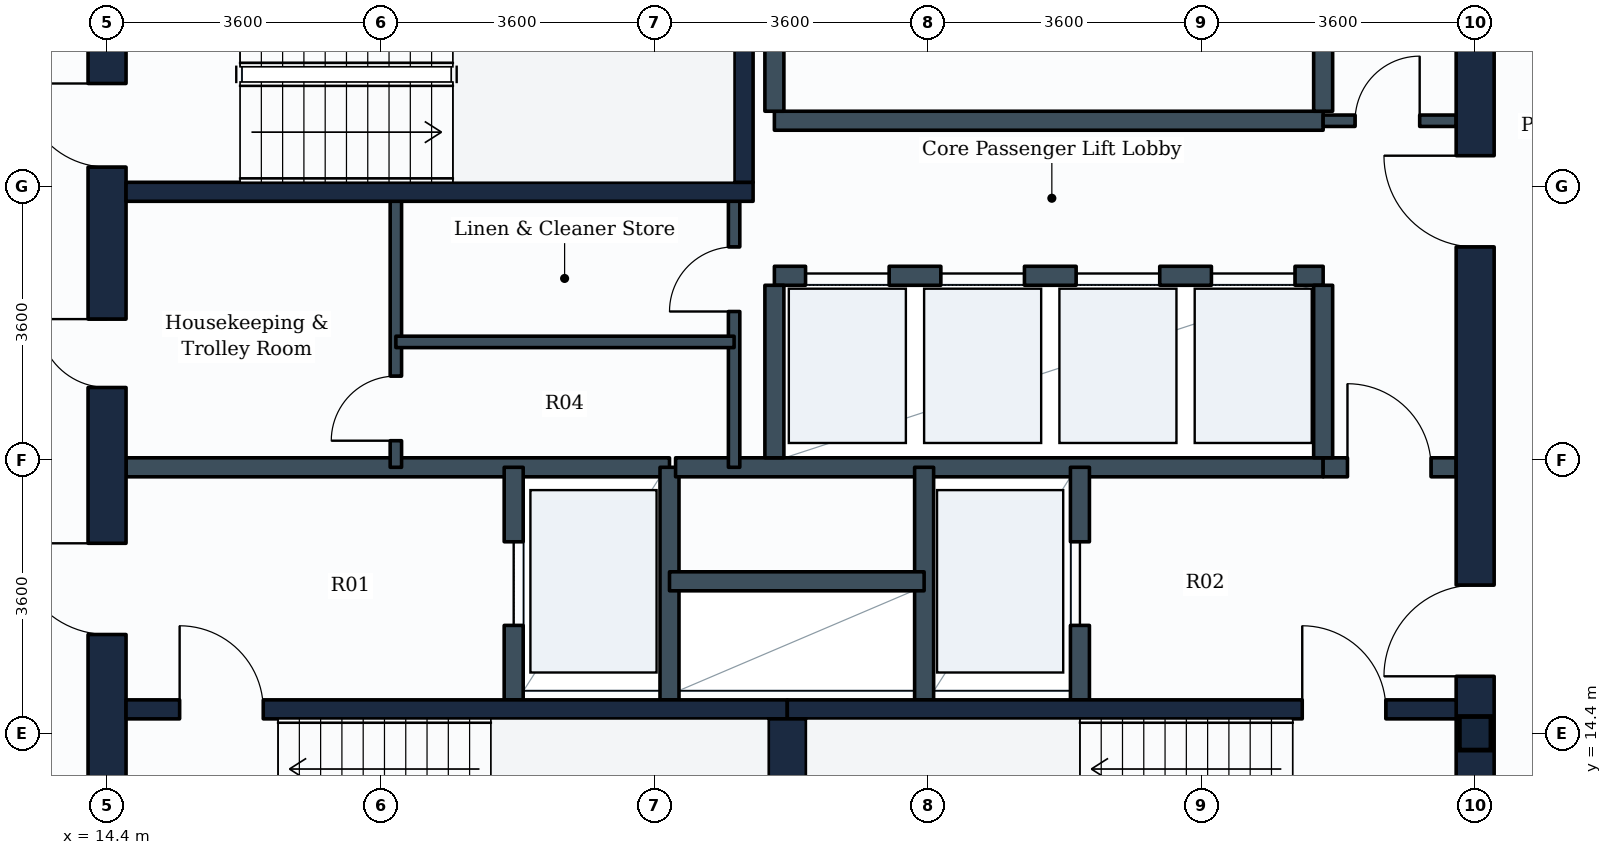
"""IFC4 building model, lengths in metres.
Left out: names, types, materials, properties, quantities, classifications, styles, units other than length and angle.
Written with IfcOpenShell. Run it as: python <this file> out.ifc"""

import sys

from ifc_helpers import new_model, si_unit, direction, frame, frame_2d, origin, origin_2d, place, context, subcontext, project, spatial, rectangle, i_section, extrude, element, fill, save


model = new_model("IFC4")
c1 = context("Model", 3, precision=1e-05, world=origin(), true_north=direction((0.0, 1.0)))
c2 = subcontext(c1, "Body", "Model", "MODEL_VIEW")
j1 = project(units=[si_unit("LENGTHUNIT", "METRE"), si_unit("PLANEANGLEUNIT", "RADIAN")], contexts=[c1])
p1 = place(None, origin())
s1 = spatial("IfcSite", under=j1, at=p1, CompositionType="ELEMENT")
p2 = place(p1, origin())
s2 = spatial("IfcBuilding", under=s1, at=p2, CompositionType="ELEMENT")
p3 = place(p2, frame((0.0, 0.0, 190.0)))
s3 = spatial("IfcBuildingStorey", under=s2, at=p3, CompositionType="ELEMENT", Elevation=190.0)
p4 = place(p3, frame((32.4, 14.4, 0.0), z_axis=(0.0, 0.0, 1.0), x_axis=(1.0, 0.0, 0.0)))
e1 = element("IfcColumn", 1, at=p4, inside=s3, PredefinedType="COLUMN", context=c2, shape_type="SweptSolid", body=[
    extrude(i_section(OverallWidth=0.416, OverallDepth=0.442, WebThickness=0.025, FlangeThickness=0.041, FilletRadius=0.015, at=origin_2d()), origin(), (0.0, 0.0, 1.0), 3.8),
])
p5 = place(p3, frame((14.4, 10.8, 0.0), z_axis=(0.0, 0.0, 1.0), x_axis=(0.0, 1.0, 0.0)))
e2 = element("IfcWall", 2, at=p5, inside=s3, PredefinedType="SHEAR", context=c2, shape_type="SweptSolid", body=[
    extrude(rectangle(XDim=14.4, YDim=0.5, at=frame_2d((7.2, 0.0))), origin(), (0.0, 0.0, 1.0), 3.55),
])
p6 = place(p5, frame((11.05, 0.0, 0.0)))
e3 = element("IfcOpeningElement", 3, at=p6, cuts=e2, PredefinedType="OPENING", context=c2, shape_type="SweptSolid", body=[
    extrude(rectangle(XDim=1.1, YDim=2.1, at=frame_2d((0.55, 1.05))), frame((0.0, 0.26, 0.0), z_axis=(0.0, -1.0, 0.0), x_axis=(1.0, 0.0, 0.0)), (0.0, 0.0, 1.0), 0.52),
])
p7 = place(p5, frame((4.9, 0.0, 0.0)))
e4 = element("IfcOpeningElement", 4, at=p7, cuts=e2, PredefinedType="OPENING", context=c2, shape_type="SweptSolid", body=[
    extrude(rectangle(XDim=1.2, YDim=2.1, at=frame_2d((0.6, 1.05))), frame((0.0, 0.26, 0.0), z_axis=(0.0, -1.0, 0.0), x_axis=(1.0, 0.0, 0.0)), (0.0, 0.0, 1.0), 0.52),
])
p8 = place(p5, frame((8.15, 0.0, 0.0)))
e5 = element("IfcOpeningElement", 5, at=p8, cuts=e2, PredefinedType="OPENING", context=c2, shape_type="SweptSolid", body=[
    extrude(rectangle(XDim=0.9, YDim=2.1, at=frame_2d((0.45, 1.05))), frame((0.0, 0.26, 0.0), z_axis=(0.0, -1.0, 0.0), x_axis=(1.0, 0.0, 0.0)), (0.0, 0.0, 1.0), 0.52),
])
p9 = place(p3, frame((32.4, 10.8, 0.0), z_axis=(0.0, 0.0, 1.0), x_axis=(0.0, 1.0, 0.0)))
e6 = element("IfcWall", 6, at=p9, inside=s3, PredefinedType="SHEAR", context=c2, shape_type="SweptSolid", body=[
    extrude(rectangle(XDim=14.4, YDim=0.5, at=frame_2d((7.2, 0.0))), origin(), (0.0, 0.0, 1.0), 3.55),
])
p10 = place(p9, frame((4.35, 0.0, 0.0)))
e7 = element("IfcOpeningElement", 7, at=p10, cuts=e6, PredefinedType="OPENING", context=c2, shape_type="SweptSolid", body=[
    extrude(rectangle(XDim=1.2, YDim=2.1, at=frame_2d((0.6, 1.05))), frame((0.0, 0.26, 0.0), z_axis=(0.0, -1.0, 0.0), x_axis=(1.0, 0.0, 0.0)), (0.0, 0.0, 1.0), 0.52),
])
p11 = place(p9, frame((10.0, 0.0, 0.0)))
e8 = element("IfcOpeningElement", 8, at=p11, cuts=e6, PredefinedType="OPENING", context=c2, shape_type="SweptSolid", body=[
    extrude(rectangle(XDim=1.2, YDim=2.1, at=frame_2d((0.6, 1.05))), frame((0.0, 0.26, 0.0), z_axis=(0.0, -1.0, 0.0), x_axis=(1.0, 0.0, 0.0)), (0.0, 0.0, 1.0), 0.52),
])
p12 = place(p3, frame((14.65, 14.715, 0.0), z_axis=(0.0, 0.0, 1.0), x_axis=(1.0, 0.0, 0.0)))
e9 = element("IfcWall", 9, at=p12, inside=s3, PredefinedType="SHEAR", context=c2, shape_type="SweptSolid", body=[
    extrude(rectangle(XDim=8.7, YDim=0.25, at=frame_2d((4.35, 0.0))), origin(), (0.0, 0.0, 1.0), 3.55),
])
p13 = place(p12, frame((0.705, 0.0, 0.0)))
e10 = element("IfcOpeningElement", 10, at=p13, cuts=e9, PredefinedType="OPENING", context=c2, shape_type="SweptSolid", body=[
    extrude(rectangle(XDim=1.1, YDim=2.1, at=frame_2d((0.55, 1.05))), frame((0.0, 0.135, 0.0), z_axis=(0.0, -1.0, 0.0), x_axis=(1.0, 0.0, 0.0)), (0.0, 0.0, 1.0), 0.27),
])
p14 = place(p3, frame((23.35, 14.715, 0.0), z_axis=(0.0, 0.0, 1.0), x_axis=(1.0, 0.0, 0.0)))
e11 = element("IfcWall", 11, at=p14, inside=s3, PredefinedType="SHEAR", context=c2, shape_type="SweptSolid", body=[
    extrude(rectangle(XDim=8.8, YDim=0.25, at=frame_2d((4.4, 0.0))), origin(), (0.0, 0.0, 1.0), 3.55),
])
p15 = place(p14, frame((6.775, 0.0, 0.0)))
e12 = element("IfcOpeningElement", 12, at=p15, cuts=e11, PredefinedType="OPENING", context=c2, shape_type="SweptSolid", body=[
    extrude(rectangle(XDim=1.1, YDim=2.1, at=frame_2d((0.55, 1.05))), frame((0.0, 0.135, 0.0), z_axis=(0.0, -1.0, 0.0), x_axis=(1.0, 0.0, 0.0)), (0.0, 0.0, 1.0), 0.27),
])
p16 = place(p3, frame((23.35, 11.75, 0.0), z_axis=(0.0, 0.0, 1.0), x_axis=(0.0, 1.0, 0.0)))
e13 = element("IfcWall", 13, at=p16, inside=s3, PredefinedType="SHEAR", context=c2, shape_type="SweptSolid", body=[
    extrude(rectangle(XDim=2.84, YDim=0.5, at=frame_2d((1.42, 0.0))), origin(), (0.0, 0.0, 1.0), 3.55),
])
p17 = place(p3, frame((14.65, 21.525, 0.0), z_axis=(0.0, 0.0, 1.0), x_axis=(1.0, 0.0, 0.0)))
e14 = element("IfcWall", 14, at=p17, inside=s3, PredefinedType="SHEAR", context=c2, shape_type="SweptSolid", body=[
    extrude(rectangle(XDim=8.25, YDim=0.25, at=frame_2d((4.125, 0.0))), origin(), (0.0, 0.0, 1.0), 3.55),
])
p18 = place(p3, frame((22.775, 21.65, 0.0), z_axis=(0.0, 0.0, 1.0), x_axis=(0.0, 1.0, 0.0)))
e15 = element("IfcWall", 15, at=p18, inside=s3, PredefinedType="SHEAR", context=c2, shape_type="SweptSolid", body=[
    extrude(rectangle(XDim=2.84, YDim=0.25, at=frame_2d((1.42, 0.0))), origin(), (0.0, 0.0, 1.0), 3.55),
])
p19 = place(p3, frame((14.65, 17.9, 0.0), z_axis=(0.0, 0.0, 1.0), x_axis=(1.0, 0.0, 0.0)))
e16 = element("IfcWall", 16, at=p19, inside=s3, PredefinedType="PARTITIONING", context=c2, shape_type="SweptSolid", body=[
    extrude(rectangle(XDim=7.15, YDim=0.25, at=frame_2d((3.575, 0.0))), origin(), (0.0, 0.0, 1.0), 3.535),
])
p20 = place(p3, frame((19.75, 14.84, 0.0), z_axis=(0.0, 0.0, 1.0), x_axis=(0.0, 1.0, 0.0)))
e17 = element("IfcWall", 17, at=p20, inside=s3, PredefinedType="PARTITIONING", context=c2, shape_type="SweptSolid", body=[
    extrude(rectangle(XDim=3.06, YDim=0.25, at=frame_2d((1.53, 0.0))), origin(), (0.0, 0.0, 1.0), 3.535),
])
p21 = place(p20, frame((0.98, 0.0, 0.0)))
e18 = element("IfcOpeningElement", 18, at=p21, cuts=e17, PredefinedType="OPENING", context=c2, shape_type="SweptSolid", body=[
    extrude(rectangle(XDim=1.1, YDim=2.1, at=frame_2d((0.55, 1.05))), frame((0.0, 0.135, 0.0), z_axis=(0.0, -1.0, 0.0), x_axis=(1.0, 0.0, 0.0)), (0.0, 0.0, 1.0), 0.27),
])
p22 = place(p3, frame((21.8, 14.84, 0.0), z_axis=(0.0, 0.0, 1.0), x_axis=(0.0, 1.0, 0.0)))
e19 = element("IfcWall", 19, at=p22, inside=s3, PredefinedType="PARTITIONING", context=c2, shape_type="SweptSolid", body=[
    extrude(rectangle(XDim=3.06, YDim=0.25, at=frame_2d((1.53, 0.0))), origin(), (0.0, 0.0, 1.0), 3.535),
])
p23 = place(p3, frame((21.88, 17.9, 0.0), z_axis=(0.0, 0.0, 1.0), x_axis=(1.0, 0.0, 0.0)))
e20 = element("IfcWall", 20, at=p23, inside=s3, PredefinedType="PARTITIONING", context=c2, shape_type="SweptSolid", body=[
    extrude(rectangle(XDim=8.52, YDim=0.25, at=frame_2d((4.26, 0.0))), origin(), (0.0, 0.0, 1.0), 3.535),
])
p24 = place(p3, frame((30.4, 17.9, 0.0), z_axis=(0.0, 0.0, 1.0), x_axis=(1.0, 0.0, 0.0)))
e21 = element("IfcWall", 21, at=p24, inside=s3, PredefinedType="PARTITIONING", context=c2, shape_type="SweptSolid", body=[
    extrude(rectangle(XDim=1.75, YDim=0.25, at=frame_2d((0.875, 0.0))), origin(), (0.0, 0.0, 1.0), 3.535),
])
p25 = place(p24, frame((0.32, 0.0, 0.0)))
e22 = element("IfcOpeningElement", 22, at=p25, cuts=e21, PredefinedType="OPENING", context=c2, shape_type="SweptSolid", body=[
    extrude(rectangle(XDim=1.1, YDim=2.1, at=frame_2d((0.55, 1.05))), frame((0.0, 0.135, 0.0), z_axis=(0.0, -1.0, 0.0), x_axis=(1.0, 0.0, 0.0)), (0.0, 0.0, 1.0), 0.27),
])
p26 = place(p3, frame((25.15, 14.84, 0.0), z_axis=(0.0, 0.0, 1.0), x_axis=(0.0, 1.0, 0.0)))
e23 = element("IfcWall", 23, at=p26, inside=s3, PredefinedType="PARTITIONING", context=c2, shape_type="SweptSolid", body=[
    extrude(rectangle(XDim=3.06, YDim=0.25, at=frame_2d((1.53, 0.0))), origin(), (0.0, 0.0, 1.0), 3.535),
])
p27 = place(p3, frame((27.2, 14.84, 0.0), z_axis=(0.0, 0.0, 1.0), x_axis=(0.0, 1.0, 0.0)))
e24 = element("IfcWall", 24, at=p27, inside=s3, PredefinedType="PARTITIONING", context=c2, shape_type="SweptSolid", body=[
    extrude(rectangle(XDim=3.06, YDim=0.25, at=frame_2d((1.53, 0.0))), origin(), (0.0, 0.0, 1.0), 3.535),
])
p28 = place(p27, frame((0.98, 0.0, 0.0)))
e25 = element("IfcOpeningElement", 25, at=p28, cuts=e24, PredefinedType="OPENING", context=c2, shape_type="SweptSolid", body=[
    extrude(rectangle(XDim=1.1, YDim=2.1, at=frame_2d((0.55, 1.05))), frame((0.0, 0.135, 0.0), z_axis=(0.0, -1.0, 0.0), x_axis=(1.0, 0.0, 0.0)), (0.0, 0.0, 1.0), 0.27),
])
p29 = place(p3, frame((21.8, 16.4, 0.0), z_axis=(0.0, 0.0, 1.0), x_axis=(1.0, 0.0, 0.0)))
e26 = element("IfcWall", 26, at=p29, inside=s3, PredefinedType="PARTITIONING", context=c2, shape_type="SweptSolid", body=[
    extrude(rectangle(XDim=3.35, YDim=0.25, at=frame_2d((1.675, 0.0))), origin(), (0.0, 0.0, 1.0), 3.535),
])
p30 = place(p3, frame((23.18, 20.42, 0.0), z_axis=(0.0, 0.0, 1.0), x_axis=(1.0, 0.0, 0.0)))
e27 = element("IfcWall", 27, at=p30, inside=s3, PredefinedType="PARTITIONING", context=c2, shape_type="SweptSolid", body=[
    extrude(rectangle(XDim=7.22, YDim=0.25, at=frame_2d((3.61, 0.0))), origin(), (0.0, 0.0, 1.0), 3.535),
])
p31 = place(p30, frame((0.41, 0.0, 0.0)))
e28 = element("IfcOpeningElement", 28, at=p31, cuts=e27, PredefinedType="OPENING", context=c2, shape_type="SweptSolid", body=[
    extrude(rectangle(XDim=1.1, YDim=2.1, at=frame_2d((0.55, 1.05))), frame((0.0, 0.135, 0.0), z_axis=(0.0, -1.0, 0.0), x_axis=(1.0, 0.0, 0.0)), (0.0, 0.0, 1.0), 0.27),
])
p32 = place(p30, frame((2.19, 0.0, 0.0)))
e29 = element("IfcOpeningElement", 29, at=p32, cuts=e27, PredefinedType="OPENING", context=c2, shape_type="SweptSolid", body=[
    extrude(rectangle(XDim=1.1, YDim=2.1, at=frame_2d((0.55, 1.05))), frame((0.0, 0.135, 0.0), z_axis=(0.0, -1.0, 0.0), x_axis=(1.0, 0.0, 0.0)), (0.0, 0.0, 1.0), 0.27),
])
p33 = place(p30, frame((3.97, 0.0, 0.0)))
e30 = element("IfcOpeningElement", 30, at=p33, cuts=e27, PredefinedType="OPENING", context=c2, shape_type="SweptSolid", body=[
    extrude(rectangle(XDim=1.1, YDim=2.1, at=frame_2d((0.55, 1.05))), frame((0.0, 0.135, 0.0), z_axis=(0.0, -1.0, 0.0), x_axis=(1.0, 0.0, 0.0)), (0.0, 0.0, 1.0), 0.27),
])
p34 = place(p30, frame((5.75, 0.0, 0.0)))
e31 = element("IfcOpeningElement", 31, at=p34, cuts=e27, PredefinedType="OPENING", context=c2, shape_type="SweptSolid", body=[
    extrude(rectangle(XDim=1.1, YDim=2.1, at=frame_2d((0.55, 1.05))), frame((0.0, 0.135, 0.0), z_axis=(0.0, -1.0, 0.0), x_axis=(1.0, 0.0, 0.0)), (0.0, 0.0, 1.0), 0.27),
])
for number, where, z_axis, x_axis in (
    (32, (23.18, 18.025, 0.0), (0.0, 0.0, 1.0), (0.0, 1.0, 0.0)),
    (33, (30.4, 18.025, 0.0), (0.0, 0.0, 1.0), (0.0, 1.0, 0.0)),
):
    element("IfcWall", number, at=place(p3, frame(where, z_axis=z_axis, x_axis=x_axis)), inside=s3, PredefinedType="PARTITIONING", context=c2, shape_type="SweptSolid", body=[
        extrude(rectangle(XDim=2.27, YDim=0.25, at=frame_2d((1.135, 0.0))), origin(), (0.0, 0.0, 1.0), 3.535),
    ])
p35 = place(p3, frame((23.18, 22.46, 0.0), z_axis=(0.0, 0.0, 1.0), x_axis=(1.0, 0.0, 0.0)))
e34 = element("IfcWall", 34, at=p35, inside=s3, PredefinedType="PARTITIONING", context=c2, shape_type="SweptSolid", body=[
    extrude(rectangle(XDim=7.22, YDim=0.25, at=frame_2d((3.61, 0.0))), origin(), (0.0, 0.0, 1.0), 3.535),
])
for number, where, z_axis, x_axis in (
    (35, (23.18, 22.585, 0.0), (0.0, 0.0, 1.0), (0.0, 1.0, 0.0)),
    (36, (30.4, 22.585, 0.0), (0.0, 0.0, 1.0), (0.0, 1.0, 0.0)),
):
    element("IfcWall", number, at=place(p3, frame(where, z_axis=z_axis, x_axis=x_axis)), inside=s3, PredefinedType="PARTITIONING", context=c2, shape_type="SweptSolid", body=[
        extrude(rectangle(XDim=2.315, YDim=0.25, at=frame_2d((1.157, 0.0))), origin(), (0.0, 0.0, 1.0), 3.535),
    ])
p36 = place(p3, frame((22.65, 17.9, 0.0), z_axis=(0.0, 0.0, 1.0), x_axis=(0.0, 1.0, 0.0)))
e37 = element("IfcWall", 37, at=p36, inside=s3, PredefinedType="PARTITIONING", context=c2, shape_type="SweptSolid", body=[
    extrude(rectangle(XDim=3.625, YDim=0.15, at=frame_2d((1.812, 0.0))), origin(), (0.0, 0.0, 1.0), 3.535),
])
p37 = place(p36, frame((2.05, 0.0, 0.0)))
e38 = element("IfcOpeningElement", 38, at=p37, cuts=e37, PredefinedType="OPENING", context=c2, shape_type="SweptSolid", body=[
    extrude(rectangle(XDim=0.85, YDim=2.1, at=frame_2d((0.425, 1.05))), frame((0.0, 0.085, 0.0), z_axis=(0.0, -1.0, 0.0), x_axis=(1.0, 0.0, 0.0)), (0.0, 0.0, 1.0), 0.17),
])
p38 = place(p3, frame((18.2, 17.9, 0.0), z_axis=(0.0, 0.0, 1.0), x_axis=(0.0, 1.0, 0.0)))
e39 = element("IfcWall", 39, at=p38, inside=s3, PredefinedType="PARTITIONING", context=c2, shape_type="SweptSolid", body=[
    extrude(rectangle(XDim=3.625, YDim=0.15, at=frame_2d((1.812, 0.0))), origin(), (0.0, 0.0, 1.0), 3.535),
])
p39 = place(p38, frame((0.35, 0.0, 0.0)))
e40 = element("IfcOpeningElement", 40, at=p39, cuts=e39, PredefinedType="OPENING", context=c2, shape_type="SweptSolid", body=[
    extrude(rectangle(XDim=0.85, YDim=2.1, at=frame_2d((0.425, 1.05))), frame((0.0, 0.085, 0.0), z_axis=(0.0, -1.0, 0.0), x_axis=(1.0, 0.0, 0.0)), (0.0, 0.0, 1.0), 0.17),
])
p40 = place(p3, frame((18.2, 19.55, 0.0), z_axis=(0.0, 0.0, 1.0), x_axis=(1.0, 0.0, 0.0)))
e41 = element("IfcWall", 41, at=p40, inside=s3, PredefinedType="PARTITIONING", context=c2, shape_type="SweptSolid", body=[
    extrude(rectangle(XDim=4.45, YDim=0.15, at=frame_2d((2.225, 0.0))), origin(), (0.0, 0.0, 1.0), 3.535),
])
p41 = place(p3, frame((30.4, 22.46, 0.0), z_axis=(0.0, 0.0, 1.0), x_axis=(1.0, 0.0, 0.0)))
e42 = element("IfcWall", 42, at=p41, inside=s3, PredefinedType="PARTITIONING", context=c2, shape_type="SweptSolid", body=[
    extrude(rectangle(XDim=1.75, YDim=0.15, at=frame_2d((0.875, 0.0))), origin(), (0.0, 0.0, 1.0), 3.535),
])
p42 = place(p41, frame((0.42, 0.0, 0.0)))
e43 = element("IfcOpeningElement", 43, at=p42, cuts=e42, PredefinedType="OPENING", context=c2, shape_type="SweptSolid", body=[
    extrude(rectangle(XDim=0.85, YDim=2.1, at=frame_2d((0.425, 1.05))), frame((0.0, 0.085, 0.0), z_axis=(0.0, -1.0, 0.0), x_axis=(1.0, 0.0, 0.0)), (0.0, 0.0, 1.0), 0.17),
])
p43 = place(p13, origin())
e44 = element("IfcDoor", 44, at=p43, inside=s3, OperationType="SINGLE_SWING_LEFT", PredefinedType="DOOR", context=c2, shape_type="SweptSolid", body=[
    extrude(rectangle(XDim=1.1, YDim=2.1, at=frame_2d((0.55, 1.05))), frame((0.0, 0.025, 0.0), z_axis=(0.0, -1.0, 0.0), x_axis=(1.0, 0.0, 0.0)), (0.0, 0.0, 1.0), 0.05),
])
fill(e10, e44)
p44 = place(p15, origin())
e45 = element("IfcDoor", 45, at=p44, inside=s3, OperationType="SINGLE_SWING_LEFT", PredefinedType="DOOR", context=c2, shape_type="SweptSolid", body=[
    extrude(rectangle(XDim=1.1, YDim=2.1, at=frame_2d((0.55, 1.05))), frame((0.0, 0.025, 0.0), z_axis=(0.0, -1.0, 0.0), x_axis=(1.0, 0.0, 0.0)), (0.0, 0.0, 1.0), 0.05),
])
fill(e12, e45)
p45 = place(p6, origin())
e46 = element("IfcDoor", 46, at=p45, inside=s3, OperationType="SINGLE_SWING_RIGHT", PredefinedType="DOOR", context=c2, shape_type="SweptSolid", body=[
    extrude(rectangle(XDim=1.1, YDim=2.1, at=frame_2d((0.55, 1.05))), frame((0.0, 0.025, 0.0), z_axis=(0.0, -1.0, 0.0), x_axis=(1.0, 0.0, 0.0)), (0.0, 0.0, 1.0), 0.05),
])
fill(e3, e46)
p46 = place(p21, origin())
e47 = element("IfcDoor", 47, at=p46, inside=s3, OperationType="SLIDING_TO_LEFT", PredefinedType="DOOR", context=c2, shape_type="SweptSolid", body=[
    extrude(rectangle(XDim=1.1, YDim=2.1, at=frame_2d((0.55, 1.05))), frame((0.0, 0.025, 0.0), z_axis=(0.0, -1.0, 0.0), x_axis=(1.0, 0.0, 0.0)), (0.0, 0.0, 1.0), 0.05),
])
fill(e18, e47)
p47 = place(p28, origin())
e48 = element("IfcDoor", 48, at=p47, inside=s3, OperationType="SLIDING_TO_LEFT", PredefinedType="DOOR", context=c2, shape_type="SweptSolid", body=[
    extrude(rectangle(XDim=1.1, YDim=2.1, at=frame_2d((0.55, 1.05))), frame((0.0, 0.025, 0.0), z_axis=(0.0, -1.0, 0.0), x_axis=(1.0, 0.0, 0.0)), (0.0, 0.0, 1.0), 0.05),
])
fill(e25, e48)
p48 = place(p7, origin())
e49 = element("IfcDoor", 49, at=p48, inside=s3, OperationType="SINGLE_SWING_RIGHT", PredefinedType="DOOR", context=c2, shape_type="SweptSolid", body=[
    extrude(rectangle(XDim=1.2, YDim=2.1, at=frame_2d((0.6, 1.05))), frame((0.0, 0.025, 0.0), z_axis=(0.0, -1.0, 0.0), x_axis=(1.0, 0.0, 0.0)), (0.0, 0.0, 1.0), 0.05),
])
fill(e4, e49)
p49 = place(p10, origin())
e50 = element("IfcDoor", 50, at=p49, inside=s3, OperationType="SINGLE_SWING_LEFT", PredefinedType="DOOR", context=c2, shape_type="SweptSolid", body=[
    extrude(rectangle(XDim=1.2, YDim=2.1, at=frame_2d((0.6, 1.05))), frame((0.0, 0.025, 0.0), z_axis=(0.0, -1.0, 0.0), x_axis=(1.0, 0.0, 0.0)), (0.0, 0.0, 1.0), 0.05),
])
fill(e7, e50)
p50 = place(p25, origin())
e51 = element("IfcDoor", 51, at=p50, inside=s3, OperationType="SINGLE_SWING_LEFT", PredefinedType="DOOR", context=c2, shape_type="SweptSolid", body=[
    extrude(rectangle(XDim=1.1, YDim=2.1, at=frame_2d((0.55, 1.05))), frame((0.0, 0.025, 0.0), z_axis=(0.0, -1.0, 0.0), x_axis=(1.0, 0.0, 0.0)), (0.0, 0.0, 1.0), 0.05),
])
fill(e22, e51)
p51 = place(p31, origin())
e52 = element("IfcDoor", 52, at=p51, inside=s3, OperationType="SLIDING_TO_LEFT", PredefinedType="DOOR", context=c2, shape_type="SweptSolid", body=[
    extrude(rectangle(XDim=1.1, YDim=2.1, at=frame_2d((0.55, 1.05))), frame((0.0, 0.025, 0.0), z_axis=(0.0, -1.0, 0.0), x_axis=(1.0, 0.0, 0.0)), (0.0, 0.0, 1.0), 0.05),
])
fill(e28, e52)
p52 = place(p32, origin())
e53 = element("IfcDoor", 53, at=p52, inside=s3, OperationType="SLIDING_TO_LEFT", PredefinedType="DOOR", context=c2, shape_type="SweptSolid", body=[
    extrude(rectangle(XDim=1.1, YDim=2.1, at=frame_2d((0.55, 1.05))), frame((0.0, 0.025, 0.0), z_axis=(0.0, -1.0, 0.0), x_axis=(1.0, 0.0, 0.0)), (0.0, 0.0, 1.0), 0.05),
])
fill(e29, e53)
p53 = place(p33, origin())
e54 = element("IfcDoor", 54, at=p53, inside=s3, OperationType="SLIDING_TO_LEFT", PredefinedType="DOOR", context=c2, shape_type="SweptSolid", body=[
    extrude(rectangle(XDim=1.1, YDim=2.1, at=frame_2d((0.55, 1.05))), frame((0.0, 0.025, 0.0), z_axis=(0.0, -1.0, 0.0), x_axis=(1.0, 0.0, 0.0)), (0.0, 0.0, 1.0), 0.05),
])
fill(e30, e54)
p54 = place(p34, origin())
e55 = element("IfcDoor", 55, at=p54, inside=s3, OperationType="SLIDING_TO_LEFT", PredefinedType="DOOR", context=c2, shape_type="SweptSolid", body=[
    extrude(rectangle(XDim=1.1, YDim=2.1, at=frame_2d((0.55, 1.05))), frame((0.0, 0.025, 0.0), z_axis=(0.0, -1.0, 0.0), x_axis=(1.0, 0.0, 0.0)), (0.0, 0.0, 1.0), 0.05),
])
fill(e31, e55)
p55 = place(p11, origin())
e56 = element("IfcDoor", 56, at=p55, inside=s3, OperationType="SINGLE_SWING_RIGHT", PredefinedType="DOOR", context=c2, shape_type="SweptSolid", body=[
    extrude(rectangle(XDim=1.2, YDim=2.1, at=frame_2d((0.6, 1.05))), frame((0.0, 0.025, 0.0), z_axis=(0.0, -1.0, 0.0), x_axis=(1.0, 0.0, 0.0)), (0.0, 0.0, 1.0), 0.05),
])
fill(e8, e56)
p56 = place(p8, origin())
e57 = element("IfcDoor", 57, at=p56, inside=s3, OperationType="SINGLE_SWING_RIGHT", PredefinedType="DOOR", context=c2, shape_type="SweptSolid", body=[
    extrude(rectangle(XDim=0.9, YDim=2.1, at=frame_2d((0.45, 1.05))), frame((0.0, 0.025, 0.0), z_axis=(0.0, -1.0, 0.0), x_axis=(1.0, 0.0, 0.0)), (0.0, 0.0, 1.0), 0.05),
])
fill(e5, e57)
p57 = place(p39, origin())
e58 = element("IfcDoor", 58, at=p57, inside=s3, OperationType="SINGLE_SWING_LEFT", PredefinedType="DOOR", context=c2, shape_type="SweptSolid", body=[
    extrude(rectangle(XDim=0.85, YDim=2.1, at=frame_2d((0.425, 1.05))), frame((0.0, 0.025, 0.0), z_axis=(0.0, -1.0, 0.0), x_axis=(1.0, 0.0, 0.0)), (0.0, 0.0, 1.0), 0.05),
])
fill(e40, e58)
p58 = place(p37, origin())
e59 = element("IfcDoor", 59, at=p58, inside=s3, OperationType="SINGLE_SWING_LEFT", PredefinedType="DOOR", context=c2, shape_type="SweptSolid", body=[
    extrude(rectangle(XDim=0.85, YDim=2.1, at=frame_2d((0.425, 1.05))), frame((0.0, 0.025, 0.0), z_axis=(0.0, -1.0, 0.0), x_axis=(1.0, 0.0, 0.0)), (0.0, 0.0, 1.0), 0.05),
])
fill(e38, e59)
p59 = place(p42, origin())
e60 = element("IfcDoor", 60, at=p59, inside=s3, OperationType="SINGLE_SWING_RIGHT", PredefinedType="DOOR", context=c2, shape_type="SweptSolid", body=[
    extrude(rectangle(XDim=0.85, YDim=2.1, at=frame_2d((0.425, 1.05))), frame((0.0, 0.025, 0.0), z_axis=(0.0, -1.0, 0.0), x_axis=(1.0, 0.0, 0.0)), (0.0, 0.0, 1.0), 0.05),
])
fill(e43, e60)
save(model, sys.argv[1])
